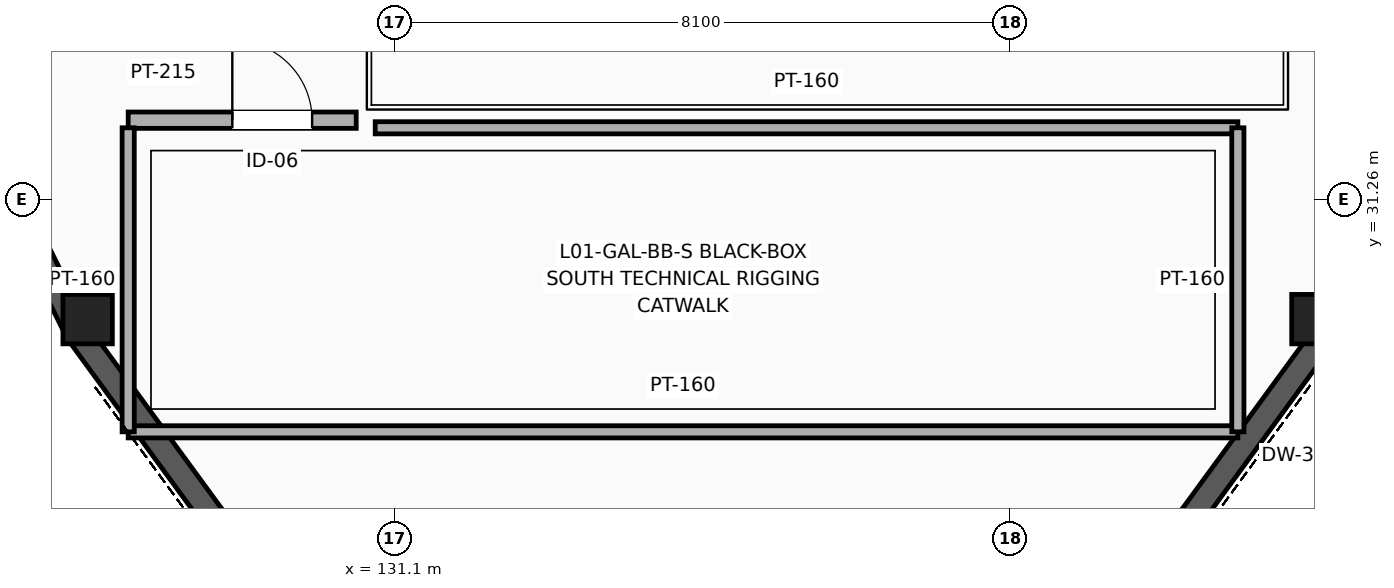
"""IFC4 building model, lengths in metres.
Left out: names, types, materials, properties, quantities, classifications, styles, units other than length and angle.
Written with IfcOpenShell. Run it as: python <this file> out.ifc"""

import sys

from ifc_helpers import new_model, si_unit, direction, frame, frame_2d, origin, origin_2d, place, context, subcontext, project, spatial, rectangle, circle, extrude, element, fill, save


model = new_model("IFC4")
c1 = context("Model", 3, precision=1e-05, world=origin(), true_north=direction((0.0, 1.0)))
c2 = subcontext(c1, "Body", "Model", "MODEL_VIEW")
j1 = project(units=[si_unit("LENGTHUNIT", "METRE"), si_unit("PLANEANGLEUNIT", "RADIAN")], contexts=[c1])
p1 = place(None, origin())
s1 = spatial("IfcSite", under=j1, at=p1, CompositionType="ELEMENT")
p2 = place(p1, origin())
s2 = spatial("IfcBuilding", under=s1, at=p2, CompositionType="ELEMENT")
p3 = place(p2, frame((0.0, 0.0, 5.4)))
s3 = spatial("IfcBuildingStorey", under=s2, at=p3, CompositionType="ELEMENT", Elevation=5.4)
for number, where, z_axis, x_axis in (
    (1, (143.234, 29.683, 0.0), (0.0, 0.0, 1.0), (1.0, 0.0, 0.0)),
    (2, (127.066, 29.683, 0.0), (0.0, 0.0, 1.0), (1.0, 0.0, 0.0)),
):
    element("IfcColumn", number, at=place(p3, frame(where, z_axis=z_axis, x_axis=x_axis)), inside=s3, PredefinedType="COLUMN", context=c2, shape_type="SweptSolid", body=[
        extrude(circle(Radius=0.325, at=origin_2d()), origin(), (0.0, 0.0, 1.0), 11.565),
    ])
for number, where, z_axis, x_axis in (
    (3, (143.362, 29.504, 0.0), (0.0, 0.0, 1.0), (-0.591, -0.807, 0.0)),
    (4, (128.724, 27.064, 0.0), (0.0, 0.0, 1.0), (-0.591, 0.807, 0.0)),
):
    element("IfcWall", number, at=place(p3, frame(where, z_axis=z_axis, x_axis=x_axis)), inside=s3, PredefinedType="SHEAR", context=c2, shape_type="SweptSolid", body=[
        extrude(rectangle(XDim=3.023, YDim=0.32, at=frame_2d((1.512, 0.0))), origin(), (0.0, 0.0, 1.0), 11.799),
    ])
p4 = place(p3, frame((126.938, 29.504, 0.0), z_axis=(0.0, 0.0, 1.0), x_axis=(-0.444471407129, 0.895793038734, 0.0)))
e5 = element("IfcWall", 5, at=p4, inside=s3, PredefinedType="SHEAR", context=c2, shape_type="SweptSolid", body=[
    extrude(rectangle(XDim=3.386, YDim=0.32, at=frame_2d((1.693, 0.0))), origin(), (0.0, 0.0, 1.0), 11.253),
])
p5 = place(p3, frame((127.6, 32.3, 0.0), z_axis=(0.0, 0.0, 1.0), x_axis=(1.0, 0.0, 0.0)))
e6 = element("IfcWall", 6, at=p5, inside=s3, PredefinedType="PARTITIONING", context=c2, shape_type="SweptSolid", body=[
    extrude(rectangle(XDim=3.0, YDim=0.215, at=frame_2d((1.5, 0.0))), origin(), (0.0, 0.0, 1.0), 4.505),
])
p6 = place(p5, frame((1.37, 0.0, 0.0)))
e7 = element("IfcOpeningElement", 7, at=p6, cuts=e6, PredefinedType="OPENING", context=c2, shape_type="SweptSolid", body=[
    extrude(rectangle(XDim=1.05, YDim=2.25, at=frame_2d((0.525, 1.125))), frame((0.0, 0.117, 0.0), z_axis=(0.0, -1.0, 0.0), x_axis=(1.0, 0.0, 0.0)), (0.0, 0.0, 1.0), 0.235),
])
p7 = place(p3, frame((127.6, 28.2, 0.0), z_axis=(0.0, 0.0, 1.0), x_axis=(1.0, 0.0, 0.0)))
e8 = element("IfcWall", 8, at=p7, inside=s3, PredefinedType="PARTITIONING", context=c2, shape_type="SweptSolid", body=[
    extrude(rectangle(XDim=14.6, YDim=0.16, at=frame_2d((7.3, 0.0))), origin(), (0.0, 0.0, 1.0), 4.505),
])
p8 = place(p3, frame((130.85, 32.2, 0.0), z_axis=(0.0, 0.0, 1.0), x_axis=(1.0, 0.0, 0.0)))
e9 = element("IfcWall", 9, at=p8, inside=s3, PredefinedType="PARTITIONING", context=c2, shape_type="SweptSolid", body=[
    extrude(rectangle(XDim=11.35, YDim=0.16, at=frame_2d((5.675, 0.0))), origin(), (0.0, 0.0, 1.0), 4.505),
])
for number, where, z_axis, x_axis in (
    (10, (127.6, 28.2, 0.0), (0.0, 0.0, 1.0), (0.0, 1.0, 0.0)),
    (11, (142.2, 28.2, 0.0), (0.0, 0.0, 1.0), (0.0, 1.0, 0.0)),
):
    element("IfcWall", number, at=place(p3, frame(where, z_axis=z_axis, x_axis=x_axis)), inside=s3, PredefinedType="PARTITIONING", context=c2, shape_type="SweptSolid", body=[
        extrude(rectangle(XDim=4.0, YDim=0.16, at=frame_2d((2.0, 0.0))), origin(), (0.0, 0.0, 1.0), 4.505),
    ])
p9 = place(p6, origin())
e12 = element("IfcDoor", 12, at=p9, inside=s3, OperationType="SINGLE_SWING_LEFT", PredefinedType="DOOR", context=c2, shape_type="SweptSolid", body=[
    extrude(rectangle(XDim=1.05, YDim=2.25, at=frame_2d((0.525, 1.125))), frame((0.0, 0.025, 0.0), z_axis=(0.0, -1.0, 0.0), x_axis=(1.0, 0.0, 0.0)), (0.0, 0.0, 1.0), 0.05),
])
fill(e7, e12)
save(model, sys.argv[1])
